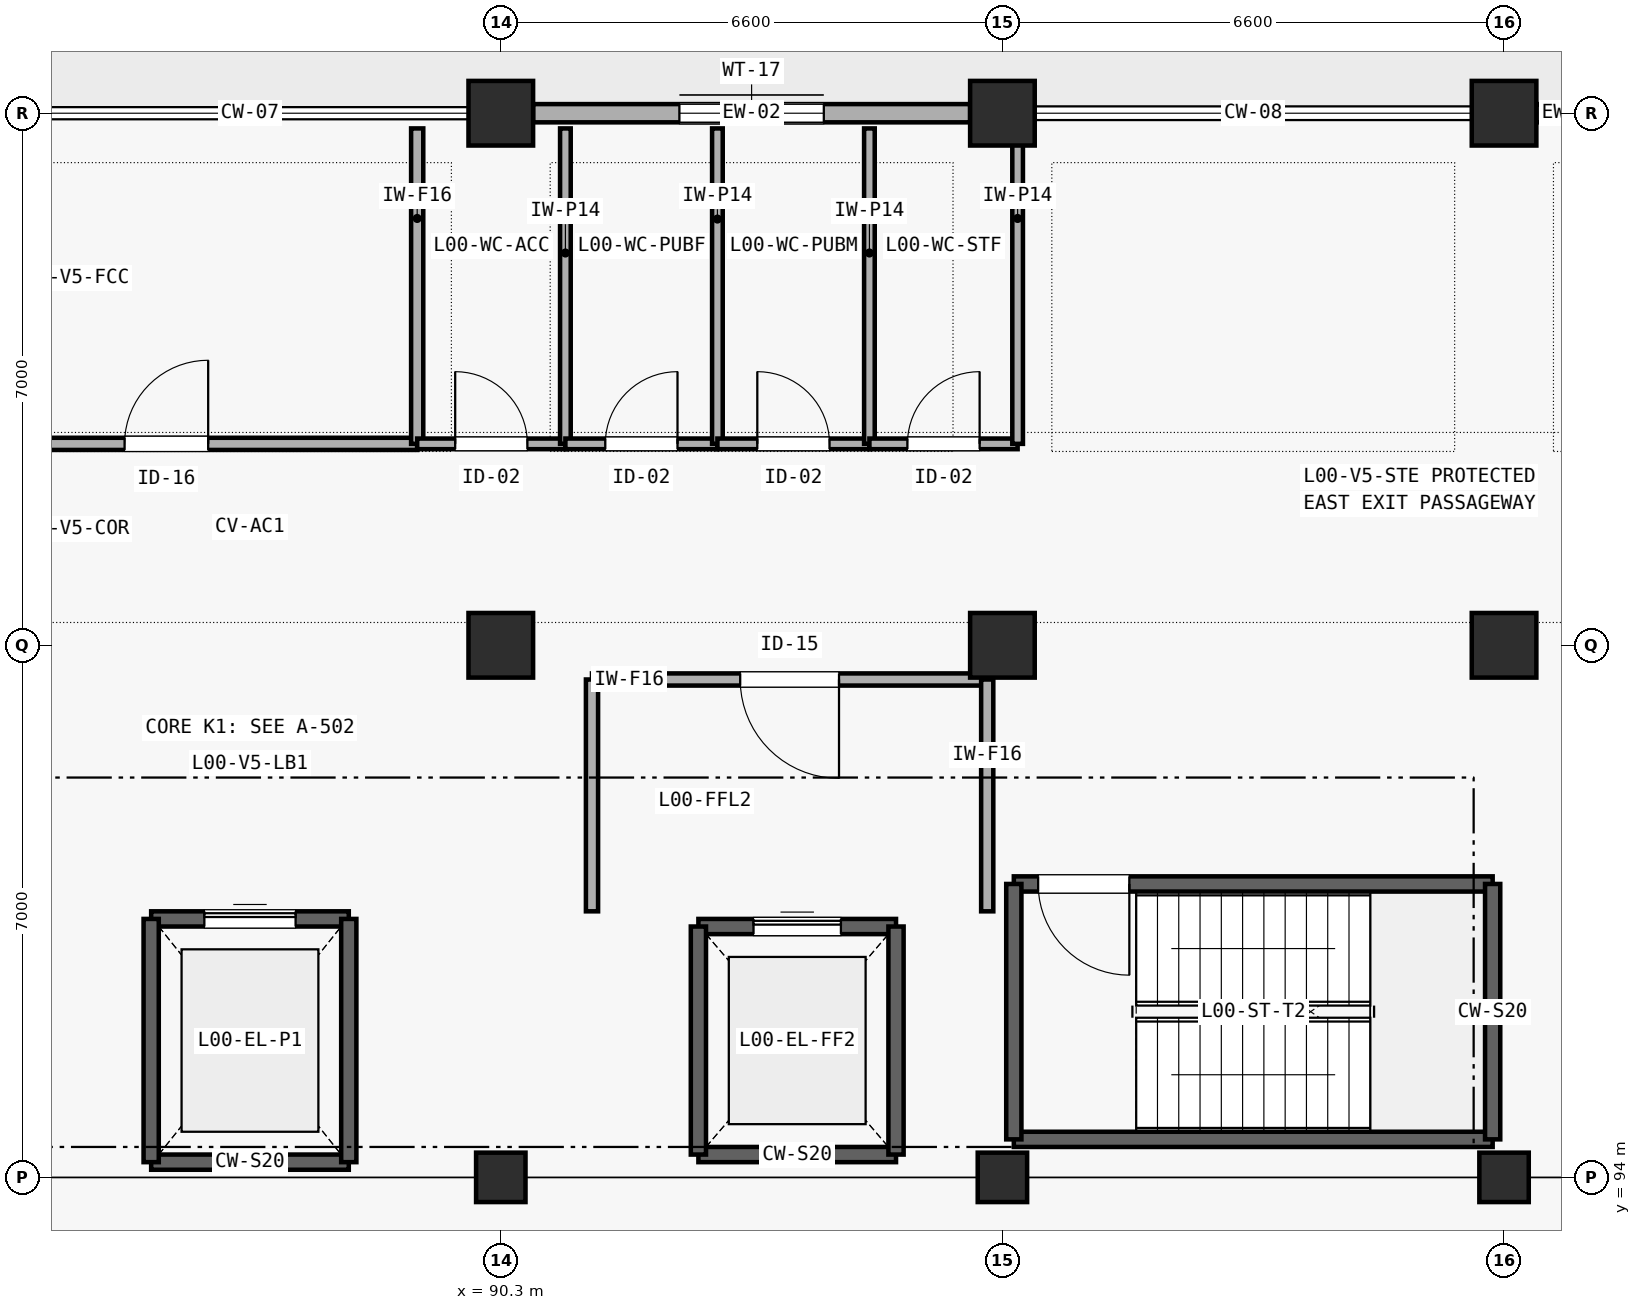
"""IFC4 building model, lengths in metres.
Left out: names, types, materials, properties, quantities, classifications, styles, units other than length and angle.
Written with IfcOpenShell. Run it as: python <this file> out.ifc"""

import sys

from ifc_helpers import new_model, si_unit, direction, frame, frame_2d, origin, origin_2d, place, context, subcontext, project, spatial, rectangle, extrude, element, fill, save


model = new_model("IFC4")
c1 = context("Model", 3, precision=1e-05, world=origin(), true_north=direction((0.0, 1.0)))
c2 = subcontext(c1, "Body", "Model", "MODEL_VIEW")
j1 = project(units=[si_unit("LENGTHUNIT", "METRE"), si_unit("PLANEANGLEUNIT", "RADIAN")], contexts=[c1])
p1 = place(None, origin())
s1 = spatial("IfcSite", under=j1, at=p1, CompositionType="ELEMENT")
p2 = place(p1, origin())
s2 = spatial("IfcBuilding", under=s1, at=p2, CompositionType="ELEMENT")
p3 = place(p2, origin())
s3 = spatial("IfcBuildingStorey", under=s2, at=p3, CompositionType="ELEMENT", Elevation=0.0)
p4 = place(p3, frame((90.3, 94.0, 0.0), z_axis=(0.0, 0.0, 1.0), x_axis=(1.0, 0.0, 0.0)))
e1 = element("IfcColumn", 1, at=p4, inside=s3, PredefinedType="COLUMN", context=c2, shape_type="SweptSolid", body=[
    extrude(rectangle(XDim=0.65, YDim=0.65, at=origin_2d()), origin(), (0.0, 0.0, 1.0), 4.2),
])
for number, where, z_axis, x_axis in (
    (2, (90.3, 101.0, 0.0), (0.0, 0.0, 1.0), (1.0, 0.0, 0.0)),
    (3, (90.3, 108.0, 0.0), (0.0, 0.0, 1.0), (1.0, 0.0, 0.0)),
):
    element("IfcColumn", number, at=place(p3, frame(where, z_axis=z_axis, x_axis=x_axis)), inside=s3, PredefinedType="COLUMN", context=c2, shape_type="SweptSolid", body=[
        extrude(rectangle(XDim=0.85, YDim=0.85, at=origin_2d()), origin(), (0.0, 0.0, 1.0), 4.2),
    ])
p5 = place(p3, frame((96.9, 94.0, 0.0), z_axis=(0.0, 0.0, 1.0), x_axis=(1.0, 0.0, 0.0)))
e4 = element("IfcColumn", 4, at=p5, inside=s3, PredefinedType="COLUMN", context=c2, shape_type="SweptSolid", body=[
    extrude(rectangle(XDim=0.65, YDim=0.65, at=origin_2d()), origin(), (0.0, 0.0, 1.0), 4.2),
])
for number, where, z_axis, x_axis in (
    (5, (96.9, 101.0, 0.0), (0.0, 0.0, 1.0), (1.0, 0.0, 0.0)),
    (6, (96.9, 108.0, 0.0), (0.0, 0.0, 1.0), (1.0, 0.0, 0.0)),
):
    element("IfcColumn", number, at=place(p3, frame(where, z_axis=z_axis, x_axis=x_axis)), inside=s3, PredefinedType="COLUMN", context=c2, shape_type="SweptSolid", body=[
        extrude(rectangle(XDim=0.85, YDim=0.85, at=origin_2d()), origin(), (0.0, 0.0, 1.0), 4.2),
    ])
p6 = place(p3, frame((103.5, 94.0, 0.0), z_axis=(0.0, 0.0, 1.0), x_axis=(1.0, 0.0, 0.0)))
e7 = element("IfcColumn", 7, at=p6, inside=s3, PredefinedType="COLUMN", context=c2, shape_type="SweptSolid", body=[
    extrude(rectangle(XDim=0.65, YDim=0.65, at=origin_2d()), origin(), (0.0, 0.0, 1.0), 4.2),
])
for number, where, z_axis, x_axis in (
    (8, (103.5, 101.0, 0.0), (0.0, 0.0, 1.0), (1.0, 0.0, 0.0)),
    (9, (103.5, 108.0, 0.0), (0.0, 0.0, 1.0), (1.0, 0.0, 0.0)),
):
    element("IfcColumn", number, at=place(p3, frame(where, z_axis=z_axis, x_axis=x_axis)), inside=s3, PredefinedType="COLUMN", context=c2, shape_type="SweptSolid", body=[
        extrude(rectangle(XDim=0.85, YDim=0.85, at=origin_2d()), origin(), (0.0, 0.0, 1.0), 4.2),
    ])
p7 = place(p3, frame((90.725, 108.0, 0.0), z_axis=(0.0, 0.0, 1.0), x_axis=(1.0, 0.0, 0.0)))
e10 = element("IfcWall", 10, at=p7, inside=s3, PredefinedType="SOLIDWALL", context=c2, shape_type="SweptSolid", body=[
    extrude(rectangle(XDim=5.75, YDim=0.24, at=frame_2d((2.875, 0.0))), origin(), (0.0, 0.0, 1.0), 3.235),
])
p8 = place(p7, frame((1.925, 0.0, 0.85)))
e11 = element("IfcOpeningElement", 11, at=p8, cuts=e10, PredefinedType="OPENING", context=c2, shape_type="SweptSolid", body=[
    extrude(rectangle(XDim=1.9, YDim=1.25, at=frame_2d((0.95, 0.625))), frame((0.0, 0.13, 0.0), z_axis=(0.0, -1.0, 0.0), x_axis=(1.0, 0.0, 0.0)), (0.0, 0.0, 1.0), 0.26),
])
p9 = place(p3, frame((103.925, 108.0, 0.0), z_axis=(0.0, 0.0, 1.0), x_axis=(1.0, 0.0, 0.0)))
e12 = element("IfcWall", 12, at=p9, inside=s3, PredefinedType="SOLIDWALL", context=c2, shape_type="SweptSolid", body=[
    extrude(rectangle(XDim=5.75, YDim=0.24, at=frame_2d((2.875, 0.0))), origin(), (0.0, 0.0, 1.0), 3.365),
])
p10 = place(p9, frame((1.875, 0.0, 0.0)))
e13 = element("IfcOpeningElement", 13, at=p10, cuts=e12, PredefinedType="OPENING", context=c2, shape_type="SweptSolid", body=[
    extrude(rectangle(XDim=2.0, YDim=2.2, at=frame_2d((1.0, 1.1))), frame((0.0, 0.13, 0.0), z_axis=(0.0, -1.0, 0.0), x_axis=(1.0, 0.0, 0.0)), (0.0, 0.0, 1.0), 0.26),
])
p11 = place(p3, frame((97.05, 94.5, 0.0), z_axis=(0.0, 0.0, 1.0), x_axis=(1.0, 0.0, 0.0)))
e14 = element("IfcWall", 14, at=p11, inside=s3, PredefinedType="SHEAR", context=c2, shape_type="SweptSolid", body=[
    extrude(rectangle(XDim=6.3, YDim=0.2, at=frame_2d((3.15, 0.0))), origin(), (0.0, 0.0, 1.0), 4.2),
])
p12 = place(p3, frame((97.05, 97.86, 0.0), z_axis=(0.0, 0.0, 1.0), x_axis=(1.0, 0.0, 0.0)))
e15 = element("IfcWall", 15, at=p12, inside=s3, PredefinedType="SHEAR", context=c2, shape_type="SweptSolid", body=[
    extrude(rectangle(XDim=6.3, YDim=0.2, at=frame_2d((3.15, 0.0))), origin(), (0.0, 0.0, 1.0), 4.2),
])
p13 = place(p12, frame((0.32, 0.0, 0.0)))
e16 = element("IfcOpeningElement", 16, at=p13, cuts=e15, PredefinedType="OPENING", context=c2, shape_type="SweptSolid", body=[
    extrude(rectangle(XDim=1.2, YDim=2.15, at=frame_2d((0.6, 1.075))), frame((0.0, 0.11, 0.0), z_axis=(0.0, -1.0, 0.0), x_axis=(1.0, 0.0, 0.0)), (0.0, 0.0, 1.0), 0.22),
])
for number, where, z_axis, x_axis in (
    (17, (97.05, 94.5, 0.0), (0.0, 0.0, 1.0), (0.0, 1.0, 0.0)),
    (18, (103.35, 94.5, 0.0), (0.0, 0.0, 1.0), (0.0, 1.0, 0.0)),
):
    element("IfcWall", number, at=place(p3, frame(where, z_axis=z_axis, x_axis=x_axis)), inside=s3, PredefinedType="SHEAR", context=c2, shape_type="SweptSolid", body=[
        extrude(rectangle(XDim=3.36, YDim=0.2, at=frame_2d((1.68, 0.0))), origin(), (0.0, 0.0, 1.0), 4.2),
    ])
p14 = place(p3, frame((92.9, 94.3, 0.0), z_axis=(0.0, 0.0, 1.0), x_axis=(1.0, 0.0, 0.0)))
e19 = element("IfcWall", 19, at=p14, inside=s3, PredefinedType="SHEAR", context=c2, shape_type="SweptSolid", body=[
    extrude(rectangle(XDim=2.6, YDim=0.2, at=frame_2d((1.3, 0.0))), origin(), (0.0, 0.0, 1.0), 4.2),
])
p15 = place(p3, frame((92.9, 97.3, 0.0), z_axis=(0.0, 0.0, 1.0), x_axis=(1.0, 0.0, 0.0)))
e20 = element("IfcWall", 20, at=p15, inside=s3, PredefinedType="SHEAR", context=c2, shape_type="SweptSolid", body=[
    extrude(rectangle(XDim=2.6, YDim=0.2, at=frame_2d((1.3, 0.0))), origin(), (0.0, 0.0, 1.0), 4.2),
])
p16 = place(p15, frame((0.725, 0.0, 0.0)))
e21 = element("IfcOpeningElement", 21, at=p16, cuts=e20, PredefinedType="OPENING", context=c2, shape_type="SweptSolid", body=[
    extrude(rectangle(XDim=1.15, YDim=2.2, at=frame_2d((0.575, 1.1))), frame((0.0, 0.11, 0.0), z_axis=(0.0, -1.0, 0.0), x_axis=(1.0, 0.0, 0.0)), (0.0, 0.0, 1.0), 0.22),
])
for number, where, z_axis, x_axis in (
    (22, (92.9, 94.3, 0.0), (0.0, 0.0, 1.0), (0.0, 1.0, 0.0)),
    (23, (95.5, 94.3, 0.0), (0.0, 0.0, 1.0), (0.0, 1.0, 0.0)),
):
    element("IfcWall", number, at=place(p3, frame(where, z_axis=z_axis, x_axis=x_axis)), inside=s3, PredefinedType="SHEAR", context=c2, shape_type="SweptSolid", body=[
        extrude(rectangle(XDim=3.0, YDim=0.2, at=frame_2d((1.5, 0.0))), origin(), (0.0, 0.0, 1.0), 4.2),
    ])
p17 = place(p3, frame((85.7, 94.2, 0.0), z_axis=(0.0, 0.0, 1.0), x_axis=(1.0, 0.0, 0.0)))
e24 = element("IfcWall", 24, at=p17, inside=s3, PredefinedType="SHEAR", context=c2, shape_type="SweptSolid", body=[
    extrude(rectangle(XDim=2.6, YDim=0.2, at=frame_2d((1.3, 0.0))), origin(), (0.0, 0.0, 1.0), 4.2),
])
p18 = place(p3, frame((85.7, 97.4, 0.0), z_axis=(0.0, 0.0, 1.0), x_axis=(1.0, 0.0, 0.0)))
e25 = element("IfcWall", 25, at=p18, inside=s3, PredefinedType="SHEAR", context=c2, shape_type="SweptSolid", body=[
    extrude(rectangle(XDim=2.6, YDim=0.2, at=frame_2d((1.3, 0.0))), origin(), (0.0, 0.0, 1.0), 4.2),
])
p19 = place(p18, frame((0.7, 0.0, 0.0)))
e26 = element("IfcOpeningElement", 26, at=p19, cuts=e25, PredefinedType="OPENING", context=c2, shape_type="SweptSolid", body=[
    extrude(rectangle(XDim=1.2, YDim=2.2, at=frame_2d((0.6, 1.1))), frame((0.0, 0.11, 0.0), z_axis=(0.0, -1.0, 0.0), x_axis=(1.0, 0.0, 0.0)), (0.0, 0.0, 1.0), 0.22),
])
for number, where, z_axis, x_axis in (
    (27, (85.7, 94.2, 0.0), (0.0, 0.0, 1.0), (0.0, 1.0, 0.0)),
    (28, (88.3, 94.2, 0.0), (0.0, 0.0, 1.0), (0.0, 1.0, 0.0)),
):
    element("IfcWall", number, at=place(p3, frame(where, z_axis=z_axis, x_axis=x_axis)), inside=s3, PredefinedType="SHEAR", context=c2, shape_type="SweptSolid", body=[
        extrude(rectangle(XDim=3.2, YDim=0.2, at=frame_2d((1.6, 0.0))), origin(), (0.0, 0.0, 1.0), 4.2),
    ])
p20 = place(p3, frame((91.5, 100.55, 0.0), z_axis=(0.0, 0.0, 1.0), x_axis=(1.0, 0.0, 0.0)))
e29 = element("IfcWall", 29, at=p20, inside=s3, PredefinedType="SOLIDWALL", context=c2, shape_type="SweptSolid", body=[
    extrude(rectangle(XDim=5.2, YDim=0.16, at=frame_2d((2.6, 0.0))), origin(), (0.0, 0.0, 1.0), 3.9),
])
p21 = place(p20, frame((1.95, 0.0, 0.0)))
e30 = element("IfcOpeningElement", 30, at=p21, cuts=e29, PredefinedType="OPENING", context=c2, shape_type="SweptSolid", body=[
    extrude(rectangle(XDim=1.3, YDim=2.15, at=frame_2d((0.65, 1.075))), frame((0.0, 0.09, 0.0), z_axis=(0.0, -1.0, 0.0), x_axis=(1.0, 0.0, 0.0)), (0.0, 0.0, 1.0), 0.18),
])
p22 = place(p3, frame((91.5, 97.5, 0.0), z_axis=(0.0, 0.0, 1.0), x_axis=(0.0, 1.0, 0.0)))
e31 = element("IfcWall", 31, at=p22, inside=s3, PredefinedType="SOLIDWALL", context=c2, shape_type="SweptSolid", body=[
    extrude(rectangle(XDim=3.05, YDim=0.16, at=frame_2d((1.525, 0.0))), origin(), (0.0, 0.0, 1.0), 3.9),
])
p23 = place(p3, frame((96.7, 97.5, 0.0), z_axis=(0.0, 0.0, 1.0), x_axis=(0.0, 1.0, 0.0)))
e32 = element("IfcWall", 32, at=p23, inside=s3, PredefinedType="SOLIDWALL", context=c2, shape_type="SweptSolid", body=[
    extrude(rectangle(XDim=3.05, YDim=0.16, at=frame_2d((1.525, 0.0))), origin(), (0.0, 0.0, 1.0), 3.405),
])
p24 = place(p3, frame((82.6, 103.65, 0.0), z_axis=(0.0, 0.0, 1.0), x_axis=(1.0, 0.0, 0.0)))
e33 = element("IfcWall", 33, at=p24, inside=s3, PredefinedType="SOLIDWALL", context=c2, shape_type="SweptSolid", body=[
    extrude(rectangle(XDim=6.6, YDim=0.16, at=frame_2d((3.3, 0.0))), origin(), (0.0, 0.0, 1.0), 3.9),
])
p25 = place(p24, frame((2.75, 0.0, 0.0)))
e34 = element("IfcOpeningElement", 34, at=p25, cuts=e33, PredefinedType="OPENING", context=c2, shape_type="SweptSolid", body=[
    extrude(rectangle(XDim=1.1, YDim=2.2, at=frame_2d((0.55, 1.1))), frame((0.0, 0.09, 0.0), z_axis=(0.0, -1.0, 0.0), x_axis=(1.0, 0.0, 0.0)), (0.0, 0.0, 1.0), 0.18),
])
p26 = place(p3, frame((89.2, 103.65, 0.0), z_axis=(0.0, 0.0, 1.0), x_axis=(0.0, 1.0, 0.0)))
e35 = element("IfcWall", 35, at=p26, inside=s3, PredefinedType="SOLIDWALL", context=c2, shape_type="SweptSolid", body=[
    extrude(rectangle(XDim=4.15, YDim=0.16, at=frame_2d((2.075, 0.0))), origin(), (0.0, 0.0, 1.0), 3.9),
])
p27 = place(p3, frame((89.2, 103.65, 0.0), z_axis=(0.0, 0.0, 1.0), x_axis=(1.0, 0.0, 0.0)))
e36 = element("IfcWall", 36, at=p27, inside=s3, PredefinedType="PLUMBINGWALL", context=c2, shape_type="SweptSolid", body=[
    extrude(rectangle(XDim=1.95, YDim=0.14, at=frame_2d((0.975, 0.0))), origin(), (0.0, 0.0, 1.0), 3.9),
])
p28 = place(p27, frame((0.5, 0.0, 0.0)))
e37 = element("IfcOpeningElement", 37, at=p28, cuts=e36, PredefinedType="OPENING", context=c2, shape_type="SweptSolid", body=[
    extrude(rectangle(XDim=0.95, YDim=2.1, at=frame_2d((0.475, 1.05))), frame((0.0, 0.08, 0.0), z_axis=(0.0, -1.0, 0.0), x_axis=(1.0, 0.0, 0.0)), (0.0, 0.0, 1.0), 0.16),
])
p29 = place(p3, frame((91.15, 103.65, 0.0), z_axis=(0.0, 0.0, 1.0), x_axis=(0.0, 1.0, 0.0)))
e38 = element("IfcWall", 38, at=p29, inside=s3, PredefinedType="PLUMBINGWALL", context=c2, shape_type="SweptSolid", body=[
    extrude(rectangle(XDim=4.15, YDim=0.14, at=frame_2d((2.075, 0.0))), origin(), (0.0, 0.0, 1.0), 3.9),
])
p30 = place(p3, frame((91.15, 103.65, 0.0), z_axis=(0.0, 0.0, 1.0), x_axis=(1.0, 0.0, 0.0)))
e39 = element("IfcWall", 39, at=p30, inside=s3, PredefinedType="PLUMBINGWALL", context=c2, shape_type="SweptSolid", body=[
    extrude(rectangle(XDim=2.0, YDim=0.14, at=frame_2d((1.0, 0.0))), origin(), (0.0, 0.0, 1.0), 3.9),
])
p31 = place(p30, frame((0.525, 0.0, 0.0)))
e40 = element("IfcOpeningElement", 40, at=p31, cuts=e39, PredefinedType="OPENING", context=c2, shape_type="SweptSolid", body=[
    extrude(rectangle(XDim=0.95, YDim=2.1, at=frame_2d((0.475, 1.05))), frame((0.0, 0.08, 0.0), z_axis=(0.0, -1.0, 0.0), x_axis=(1.0, 0.0, 0.0)), (0.0, 0.0, 1.0), 0.16),
])
p32 = place(p3, frame((93.15, 103.65, 0.0), z_axis=(0.0, 0.0, 1.0), x_axis=(0.0, 1.0, 0.0)))
e41 = element("IfcWall", 41, at=p32, inside=s3, PredefinedType="PLUMBINGWALL", context=c2, shape_type="SweptSolid", body=[
    extrude(rectangle(XDim=4.15, YDim=0.14, at=frame_2d((2.075, 0.0))), origin(), (0.0, 0.0, 1.0), 3.9),
])
p33 = place(p3, frame((93.15, 103.65, 0.0), z_axis=(0.0, 0.0, 1.0), x_axis=(1.0, 0.0, 0.0)))
e42 = element("IfcWall", 42, at=p33, inside=s3, PredefinedType="PLUMBINGWALL", context=c2, shape_type="SweptSolid", body=[
    extrude(rectangle(XDim=2.0, YDim=0.14, at=frame_2d((1.0, 0.0))), origin(), (0.0, 0.0, 1.0), 3.9),
])
p34 = place(p33, frame((0.525, 0.0, 0.0)))
e43 = element("IfcOpeningElement", 43, at=p34, cuts=e42, PredefinedType="OPENING", context=c2, shape_type="SweptSolid", body=[
    extrude(rectangle(XDim=0.95, YDim=2.1, at=frame_2d((0.475, 1.05))), frame((0.0, 0.08, 0.0), z_axis=(0.0, -1.0, 0.0), x_axis=(1.0, 0.0, 0.0)), (0.0, 0.0, 1.0), 0.16),
])
p35 = place(p3, frame((95.15, 103.65, 0.0), z_axis=(0.0, 0.0, 1.0), x_axis=(0.0, 1.0, 0.0)))
e44 = element("IfcWall", 44, at=p35, inside=s3, PredefinedType="PLUMBINGWALL", context=c2, shape_type="SweptSolid", body=[
    extrude(rectangle(XDim=4.15, YDim=0.14, at=frame_2d((2.075, 0.0))), origin(), (0.0, 0.0, 1.0), 3.9),
])
p36 = place(p3, frame((95.15, 103.65, 0.0), z_axis=(0.0, 0.0, 1.0), x_axis=(1.0, 0.0, 0.0)))
e45 = element("IfcWall", 45, at=p36, inside=s3, PredefinedType="PLUMBINGWALL", context=c2, shape_type="SweptSolid", body=[
    extrude(rectangle(XDim=1.95, YDim=0.14, at=frame_2d((0.975, 0.0))), origin(), (0.0, 0.0, 1.0), 3.9),
])
p37 = place(p36, frame((0.5, 0.0, 0.0)))
e46 = element("IfcOpeningElement", 46, at=p37, cuts=e45, PredefinedType="OPENING", context=c2, shape_type="SweptSolid", body=[
    extrude(rectangle(XDim=0.95, YDim=2.1, at=frame_2d((0.475, 1.05))), frame((0.0, 0.08, 0.0), z_axis=(0.0, -1.0, 0.0), x_axis=(1.0, 0.0, 0.0)), (0.0, 0.0, 1.0), 0.16),
])
p38 = place(p3, frame((97.1, 103.65, 0.0), z_axis=(0.0, 0.0, 1.0), x_axis=(0.0, 1.0, 0.0)))
e47 = element("IfcWall", 47, at=p38, inside=s3, PredefinedType="PLUMBINGWALL", context=c2, shape_type="SweptSolid", body=[
    extrude(rectangle(XDim=4.15, YDim=0.14, at=frame_2d((2.075, 0.0))), origin(), (0.0, 0.0, 1.0), 3.505),
])
p39 = place(p8, origin())
e48 = element("IfcWindow", 48, at=p39, inside=s3, PartitioningType="SINGLE_PANEL", PredefinedType="WINDOW", context=c2, shape_type="SweptSolid", body=[
    extrude(rectangle(XDim=1.9, YDim=1.25, at=frame_2d((0.95, 0.625))), frame((0.0, 0.03, 0.0), z_axis=(0.0, -1.0, 0.0), x_axis=(1.0, 0.0, 0.0)), (0.0, 0.0, 1.0), 0.06),
])
fill(e11, e48)
p40 = place(p13, frame((1.2, 0.0, 0.0), z_axis=(0.0, 0.0, 1.0), x_axis=(-1.0, 0.0, 0.0)))
e49 = element("IfcDoor", 49, at=p40, inside=s3, OperationType="SINGLE_SWING_LEFT", PredefinedType="DOOR", context=c2, shape_type="SweptSolid", body=[
    extrude(rectangle(XDim=1.2, YDim=2.15, at=frame_2d((0.6, 1.075))), frame((0.0, 0.025, 0.0), z_axis=(0.0, -1.0, 0.0), x_axis=(1.0, 0.0, 0.0)), (0.0, 0.0, 1.0), 0.05),
])
fill(e16, e49)
p41 = place(p16, origin())
e50 = element("IfcDoor", 50, at=p41, inside=s3, OperationType="SLIDING_TO_LEFT", PredefinedType="DOOR", context=c2, shape_type="SweptSolid", body=[
    extrude(rectangle(XDim=1.15, YDim=2.2, at=frame_2d((0.575, 1.1))), frame((0.0, 0.025, 0.0), z_axis=(0.0, -1.0, 0.0), x_axis=(1.0, 0.0, 0.0)), (0.0, 0.0, 1.0), 0.05),
])
fill(e21, e50)
p42 = place(p19, origin())
e51 = element("IfcDoor", 51, at=p42, inside=s3, OperationType="SLIDING_TO_LEFT", PredefinedType="DOOR", context=c2, shape_type="SweptSolid", body=[
    extrude(rectangle(XDim=1.2, YDim=2.2, at=frame_2d((0.6, 1.1))), frame((0.0, 0.025, 0.0), z_axis=(0.0, -1.0, 0.0), x_axis=(1.0, 0.0, 0.0)), (0.0, 0.0, 1.0), 0.05),
])
fill(e26, e51)
p43 = place(p21, frame((1.3, 0.0, 0.0), z_axis=(0.0, 0.0, 1.0), x_axis=(-1.0, 0.0, 0.0)))
e52 = element("IfcDoor", 52, at=p43, inside=s3, OperationType="SINGLE_SWING_LEFT", PredefinedType="DOOR", context=c2, shape_type="SweptSolid", body=[
    extrude(rectangle(XDim=1.3, YDim=2.15, at=frame_2d((0.65, 1.075))), frame((0.0, 0.025, 0.0), z_axis=(0.0, -1.0, 0.0), x_axis=(1.0, 0.0, 0.0)), (0.0, 0.0, 1.0), 0.05),
])
fill(e30, e52)
p44 = place(p25, origin())
e53 = element("IfcDoor", 53, at=p44, inside=s3, OperationType="SINGLE_SWING_RIGHT", PredefinedType="DOOR", context=c2, shape_type="SweptSolid", body=[
    extrude(rectangle(XDim=1.1, YDim=2.2, at=frame_2d((0.55, 1.1))), frame((0.0, 0.025, 0.0), z_axis=(0.0, -1.0, 0.0), x_axis=(1.0, 0.0, 0.0)), (0.0, 0.0, 1.0), 0.05),
])
fill(e34, e53)
p45 = place(p28, origin())
e54 = element("IfcDoor", 54, at=p45, inside=s3, OperationType="SINGLE_SWING_LEFT", PredefinedType="DOOR", context=c2, shape_type="SweptSolid", body=[
    extrude(rectangle(XDim=0.95, YDim=2.1, at=frame_2d((0.475, 1.05))), frame((0.0, 0.025, 0.0), z_axis=(0.0, -1.0, 0.0), x_axis=(1.0, 0.0, 0.0)), (0.0, 0.0, 1.0), 0.05),
])
fill(e37, e54)
p46 = place(p31, origin())
e55 = element("IfcDoor", 55, at=p46, inside=s3, OperationType="SINGLE_SWING_RIGHT", PredefinedType="DOOR", context=c2, shape_type="SweptSolid", body=[
    extrude(rectangle(XDim=0.95, YDim=2.1, at=frame_2d((0.475, 1.05))), frame((0.0, 0.025, 0.0), z_axis=(0.0, -1.0, 0.0), x_axis=(1.0, 0.0, 0.0)), (0.0, 0.0, 1.0), 0.05),
])
fill(e40, e55)
p47 = place(p34, origin())
e56 = element("IfcDoor", 56, at=p47, inside=s3, OperationType="SINGLE_SWING_LEFT", PredefinedType="DOOR", context=c2, shape_type="SweptSolid", body=[
    extrude(rectangle(XDim=0.95, YDim=2.1, at=frame_2d((0.475, 1.05))), frame((0.0, 0.025, 0.0), z_axis=(0.0, -1.0, 0.0), x_axis=(1.0, 0.0, 0.0)), (0.0, 0.0, 1.0), 0.05),
])
fill(e43, e56)
p48 = place(p37, origin())
e57 = element("IfcDoor", 57, at=p48, inside=s3, OperationType="SINGLE_SWING_RIGHT", PredefinedType="DOOR", context=c2, shape_type="SweptSolid", body=[
    extrude(rectangle(XDim=0.95, YDim=2.1, at=frame_2d((0.475, 1.05))), frame((0.0, 0.025, 0.0), z_axis=(0.0, -1.0, 0.0), x_axis=(1.0, 0.0, 0.0)), (0.0, 0.0, 1.0), 0.05),
])
fill(e46, e57)
save(model, sys.argv[1])
